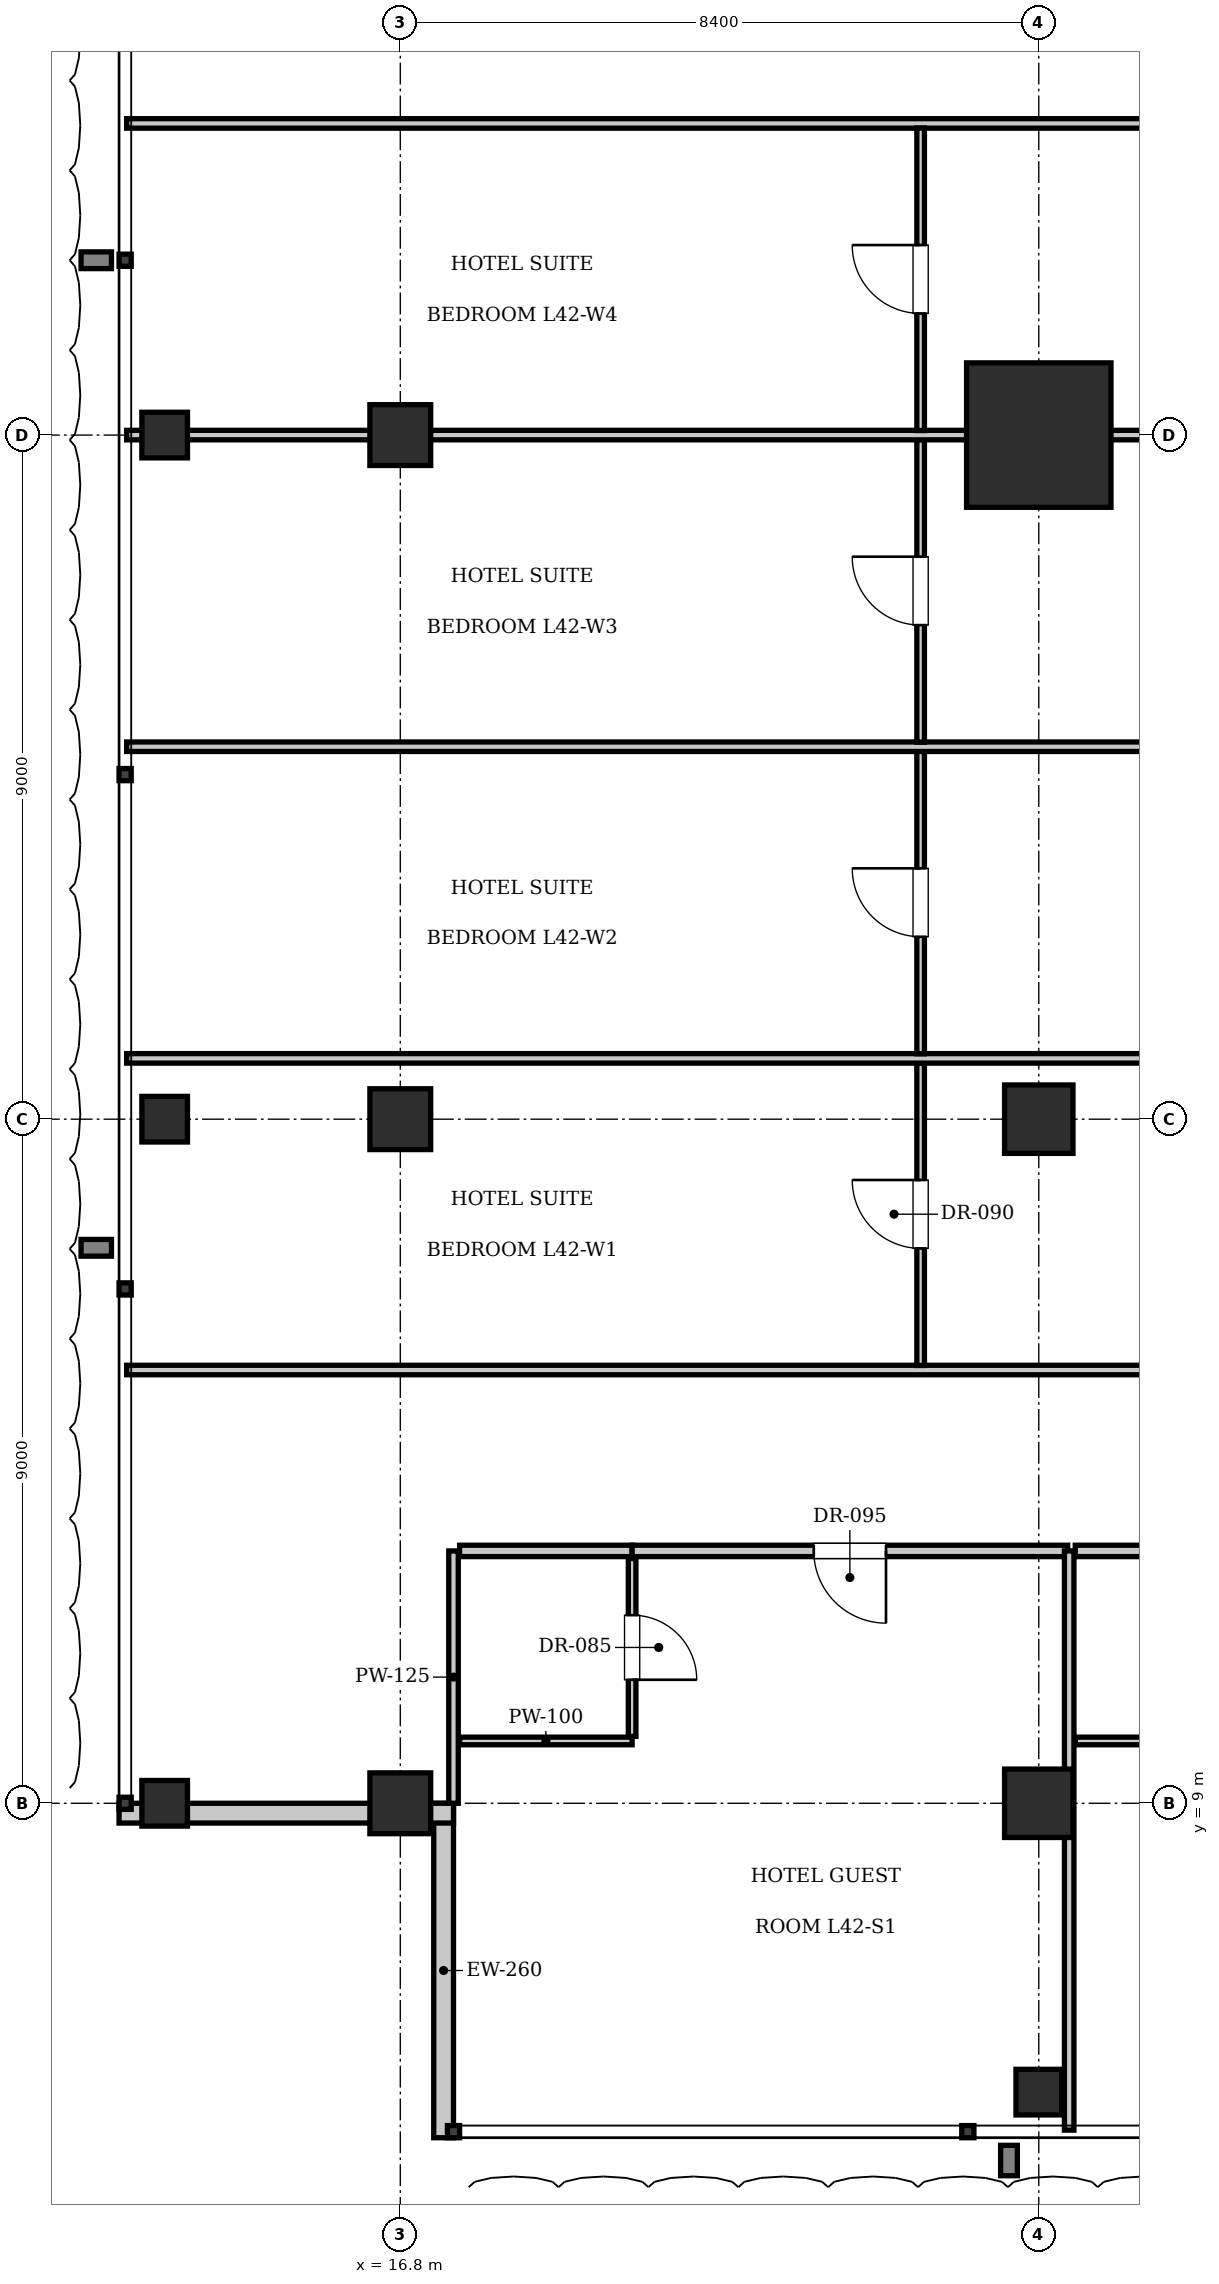
"""IFC4 building model, lengths in metres.
Left out: names, types, materials, properties, quantities, classifications, styles, units other than length and angle.
Written with IfcOpenShell. Run it as: python <this file> out.ifc"""

import sys

from ifc_helpers import new_model, si_unit, direction, frame, frame_2d, origin, origin_2d, place, context, subcontext, project, spatial, rectangle, i_section, extrude, element, fill, save


model = new_model("IFC4")
c1 = context("Model", 3, precision=1e-05, world=origin(), true_north=direction((0.0, 1.0)))
c2 = subcontext(c1, "Body", "Model", "MODEL_VIEW")
j1 = project(units=[si_unit("LENGTHUNIT", "METRE"), si_unit("PLANEANGLEUNIT", "RADIAN")], contexts=[c1])
p1 = place(None, origin())
s1 = spatial("IfcSite", under=j1, at=p1, CompositionType="ELEMENT")
p2 = place(p1, origin())
s2 = spatial("IfcBuilding", under=s1, at=p2, CompositionType="ELEMENT")
p3 = place(p2, frame((0.0, 0.0, 173.6)))
s3 = spatial("IfcBuildingStorey", under=s2, at=p3, CompositionType="ELEMENT", Elevation=173.6)
p4 = place(p3, frame((25.2, 27.0, 0.0), z_axis=(0.0, 0.0, 1.0), x_axis=(1.0, 0.0, 0.0)))
e1 = element("IfcColumn", 1, at=p4, inside=s3, PredefinedType="COLUMN", context=c2, shape_type="SweptSolid", body=[
    extrude(rectangle(XDim=1.9, YDim=1.9, at=origin_2d()), origin(), (0.0, 0.0, 1.0), 3.85),
])
for number, where, z_axis, x_axis in (
    (2, (25.2, 18.0, 0.0), (0.0, 0.0, 1.0), (1.0, 0.0, 0.0)),
    (3, (25.2, 9.0, 0.0), (0.0, 0.0, 1.0), (1.0, 0.0, 0.0)),
):
    element("IfcColumn", number, at=place(p3, frame(where, z_axis=z_axis, x_axis=x_axis)), inside=s3, PredefinedType="COLUMN", context=c2, shape_type="SweptSolid", body=[
        extrude(rectangle(XDim=0.9, YDim=0.9, at=origin_2d()), origin(), (0.0, 0.0, 1.0), 3.85),
    ])
for number, where, z_axis, x_axis in (
    (4, (16.8, 9.0, 0.0), (0.0, 0.0, 1.0), (1.0, 0.0, 0.0)),
    (5, (16.8, 18.0, 0.0), (0.0, 0.0, 1.0), (1.0, 0.0, 0.0)),
    (6, (16.8, 27.0, 0.0), (0.0, 0.0, 1.0), (1.0, 0.0, 0.0)),
):
    element("IfcColumn", number, at=place(p3, frame(where, z_axis=z_axis, x_axis=x_axis)), inside=s3, PredefinedType="COLUMN", context=c2, shape_type="SweptSolid", body=[
        extrude(rectangle(XDim=0.8, YDim=0.8, at=origin_2d()), origin(), (0.0, 0.0, 1.0), 3.85),
    ])
for number, where, z_axis, x_axis in (
    (7, (13.7, 9.0, 0.0), (0.0, 0.0, 1.0), (1.0, 0.0, 0.0)),
    (8, (13.7, 18.0, 0.0), (0.0, 0.0, 1.0), (1.0, 0.0, 0.0)),
    (9, (13.7, 27.0, 0.0), (0.0, 0.0, 1.0), (1.0, 0.0, 0.0)),
    (10, (25.2, 5.2, 0.0), (0.0, 0.0, 1.0), (1.0, 0.0, 0.0)),
):
    element("IfcColumn", number, at=place(p3, frame(where, z_axis=z_axis, x_axis=x_axis)), inside=s3, PredefinedType="COLUMN", context=c2, shape_type="SweptSolid", body=[
        extrude(i_section(OverallWidth=0.6, OverallDepth=0.6, WebThickness=0.025, FlangeThickness=0.038, at=origin_2d()), origin(), (0.0, 0.0, 1.0), 3.85),
    ])
p5 = place(p3, frame((17.37, 4.6, 0.0), z_axis=(0.0, 0.0, 1.0), x_axis=(0.0, 1.0, 0.0)))
e11 = element("IfcWall", 11, at=p5, inside=s3, PredefinedType="SOLIDWALL", context=c2, shape_type="SweptSolid", body=[
    extrude(rectangle(XDim=4.4, YDim=0.26, at=frame_2d((2.2, 0.0))), origin(), (0.0, 0.0, 1.0), 3.61),
])
p6 = place(p3, frame((17.5, 8.87, 0.0), z_axis=(0.0, 0.0, 1.0), x_axis=(-1.0, 0.0, 0.0)))
e12 = element("IfcWall", 12, at=p6, inside=s3, PredefinedType="SOLIDWALL", context=c2, shape_type="SweptSolid", body=[
    extrude(rectangle(XDim=4.4, YDim=0.26, at=frame_2d((2.2, 0.0))), origin(), (0.0, 0.0, 1.0), 3.007),
])
p7 = place(p3, frame((17.5, 9.0, 0.0), z_axis=(0.0, 0.0, 1.0), x_axis=(0.0, 1.0, 0.0)))
e13 = element("IfcWall", 13, at=p7, inside=s3, PredefinedType="PARTITIONING", context=c2, shape_type="SweptSolid", body=[
    extrude(rectangle(XDim=3.32, YDim=0.125, at=frame_2d((1.66, 0.0))), origin(), (0.0, 0.0, 1.0), 3.61),
])
p8 = place(p3, frame((17.58, 12.32, 0.0), z_axis=(0.0, 0.0, 1.0), x_axis=(1.0, 0.0, 0.0)))
e14 = element("IfcWall", 14, at=p8, inside=s3, PredefinedType="PARTITIONING", context=c2, shape_type="SweptSolid", body=[
    extrude(rectangle(XDim=2.27, YDim=0.15, at=frame_2d((1.135, 0.0))), origin(), (0.0, 0.0, 1.0), 3.61),
])
p9 = place(p3, frame((17.58, 9.82, 0.0), z_axis=(0.0, 0.0, 1.0), x_axis=(1.0, 0.0, 0.0)))
e15 = element("IfcWall", 15, at=p9, inside=s3, PredefinedType="PARTITIONING", context=c2, shape_type="SweptSolid", body=[
    extrude(rectangle(XDim=2.27, YDim=0.1, at=frame_2d((1.135, 0.0))), origin(), (0.0, 0.0, 1.0), 3.61),
])
p10 = place(p3, frame((19.85, 9.88, 0.0), z_axis=(0.0, 0.0, 1.0), x_axis=(0.0, 1.0, 0.0)))
e16 = element("IfcWall", 16, at=p10, inside=s3, PredefinedType="PARTITIONING", context=c2, shape_type="SweptSolid", body=[
    extrude(rectangle(XDim=2.34, YDim=0.1, at=frame_2d((1.17, 0.0))), origin(), (0.0, 0.0, 1.0), 3.61),
])
p11 = place(p10, frame((0.745, 0.0, 0.0)))
e17 = element("IfcOpeningElement", 17, at=p11, cuts=e16, PredefinedType="OPENING", context=c2, shape_type="SweptSolid", body=[
    extrude(rectangle(XDim=0.85, YDim=2.1, at=frame_2d((0.425, 1.05))), frame((0.0, 0.06, 0.0), z_axis=(0.0, -1.0, 0.0), x_axis=(1.0, 0.0, 0.0)), (0.0, 0.0, 1.0), 0.12),
])
p12 = place(p3, frame((19.85, 12.32, 0.0), z_axis=(0.0, 0.0, 1.0), x_axis=(1.0, 0.0, 0.0)))
e18 = element("IfcWall", 18, at=p12, inside=s3, PredefinedType="PARTITIONING", context=c2, shape_type="SweptSolid", body=[
    extrude(rectangle(XDim=5.73, YDim=0.15, at=frame_2d((2.865, 0.0))), origin(), (0.0, 0.0, 1.0), 3.61),
])
p13 = place(p12, frame((2.39, 0.0, 0.0)))
e19 = element("IfcOpeningElement", 19, at=p13, cuts=e18, PredefinedType="OPENING", context=c2, shape_type="SweptSolid", body=[
    extrude(rectangle(XDim=0.95, YDim=2.15, at=frame_2d((0.475, 1.075))), frame((0.0, 0.085, 0.0), z_axis=(0.0, -1.0, 0.0), x_axis=(1.0, 0.0, 0.0)), (0.0, 0.0, 1.0), 0.17),
])
p14 = place(p3, frame((25.6, 4.7, 0.0), z_axis=(0.0, 0.0, 1.0), x_axis=(0.0, 1.0, 0.0)))
e20 = element("IfcWall", 20, at=p14, inside=s3, PredefinedType="PARTITIONING", context=c2, shape_type="SweptSolid", body=[
    extrude(rectangle(XDim=7.62, YDim=0.125, at=frame_2d((3.81, 0.0))), origin(), (0.0, 0.0, 1.0), 3.61),
])
p15 = place(p3, frame((25.68, 12.32, 0.0), z_axis=(0.0, 0.0, 1.0), x_axis=(1.0, 0.0, 0.0)))
e21 = element("IfcWall", 21, at=p15, inside=s3, PredefinedType="PARTITIONING", context=c2, shape_type="SweptSolid", body=[
    extrude(rectangle(XDim=2.27, YDim=0.15, at=frame_2d((1.135, 0.0))), origin(), (0.0, 0.0, 1.0), 3.61),
])
p16 = place(p3, frame((25.68, 9.82, 0.0), z_axis=(0.0, 0.0, 1.0), x_axis=(1.0, 0.0, 0.0)))
e22 = element("IfcWall", 22, at=p16, inside=s3, PredefinedType="PARTITIONING", context=c2, shape_type="SweptSolid", body=[
    extrude(rectangle(XDim=2.27, YDim=0.1, at=frame_2d((1.135, 0.0))), origin(), (0.0, 0.0, 1.0), 3.61),
])
for number, where, z_axis, x_axis in (
    (23, (13.2, 14.7, 0.0), (0.0, 0.0, 1.0), (1.0, 0.0, 0.0)),
    (24, (13.2, 31.1, 0.0), (0.0, 0.0, 1.0), (1.0, 0.0, 0.0)),
):
    element("IfcWall", number, at=place(p3, frame(where, z_axis=z_axis, x_axis=x_axis)), inside=s3, PredefinedType="PARTITIONING", context=c2, shape_type="SweptSolid", body=[
        extrude(rectangle(XDim=24.32, YDim=0.125, at=frame_2d((12.16, 0.0))), origin(), (0.0, 0.0, 1.0), 3.61),
    ])
p17 = place(p3, frame((23.646, 14.76, 0.0), z_axis=(0.0, 0.0, 1.0), x_axis=(0.0, 1.0, 0.0)))
e25 = element("IfcWall", 25, at=p17, inside=s3, PredefinedType="PARTITIONING", context=c2, shape_type="SweptSolid", body=[
    extrude(rectangle(XDim=3.98, YDim=0.1, at=frame_2d((1.99, 0.0))), origin(), (0.0, 0.0, 1.0), 3.61),
])
p18 = place(p17, frame((1.54, 0.0, 0.0)))
e26 = element("IfcOpeningElement", 26, at=p18, cuts=e25, PredefinedType="OPENING", context=c2, shape_type="SweptSolid", body=[
    extrude(rectangle(XDim=0.9, YDim=2.1, at=frame_2d((0.45, 1.05))), frame((0.0, 0.06, 0.0), z_axis=(0.0, -1.0, 0.0), x_axis=(1.0, 0.0, 0.0)), (0.0, 0.0, 1.0), 0.12),
])
p19 = place(p3, frame((13.2, 18.8, 0.0), z_axis=(0.0, 0.0, 1.0), x_axis=(1.0, 0.0, 0.0)))
e27 = element("IfcWall", 27, at=p19, inside=s3, PredefinedType="PARTITIONING", context=c2, shape_type="SweptSolid", body=[
    extrude(rectangle(XDim=24.32, YDim=0.125, at=frame_2d((12.16, 0.0))), origin(), (0.0, 0.0, 1.0), 3.61),
])
p20 = place(p3, frame((23.646, 18.86, 0.0), z_axis=(0.0, 0.0, 1.0), x_axis=(0.0, 1.0, 0.0)))
e28 = element("IfcWall", 28, at=p20, inside=s3, PredefinedType="PARTITIONING", context=c2, shape_type="SweptSolid", body=[
    extrude(rectangle(XDim=3.98, YDim=0.1, at=frame_2d((1.99, 0.0))), origin(), (0.0, 0.0, 1.0), 3.61),
])
p21 = place(p20, frame((1.54, 0.0, 0.0)))
e29 = element("IfcOpeningElement", 29, at=p21, cuts=e28, PredefinedType="OPENING", context=c2, shape_type="SweptSolid", body=[
    extrude(rectangle(XDim=0.9, YDim=2.1, at=frame_2d((0.45, 1.05))), frame((0.0, 0.06, 0.0), z_axis=(0.0, -1.0, 0.0), x_axis=(1.0, 0.0, 0.0)), (0.0, 0.0, 1.0), 0.12),
])
p22 = place(p3, frame((13.2, 22.9, 0.0), z_axis=(0.0, 0.0, 1.0), x_axis=(1.0, 0.0, 0.0)))
e30 = element("IfcWall", 30, at=p22, inside=s3, PredefinedType="PARTITIONING", context=c2, shape_type="SweptSolid", body=[
    extrude(rectangle(XDim=24.32, YDim=0.125, at=frame_2d((12.16, 0.0))), origin(), (0.0, 0.0, 1.0), 3.61),
])
p23 = place(p3, frame((23.646, 22.96, 0.0), z_axis=(0.0, 0.0, 1.0), x_axis=(0.0, 1.0, 0.0)))
e31 = element("IfcWall", 31, at=p23, inside=s3, PredefinedType="PARTITIONING", context=c2, shape_type="SweptSolid", body=[
    extrude(rectangle(XDim=3.98, YDim=0.1, at=frame_2d((1.99, 0.0))), origin(), (0.0, 0.0, 1.0), 3.61),
])
p24 = place(p23, frame((1.54, 0.0, 0.0)))
e32 = element("IfcOpeningElement", 32, at=p24, cuts=e31, PredefinedType="OPENING", context=c2, shape_type="SweptSolid", body=[
    extrude(rectangle(XDim=0.9, YDim=2.1, at=frame_2d((0.45, 1.05))), frame((0.0, 0.06, 0.0), z_axis=(0.0, -1.0, 0.0), x_axis=(1.0, 0.0, 0.0)), (0.0, 0.0, 1.0), 0.12),
])
p25 = place(p3, frame((13.2, 27.0, 0.0), z_axis=(0.0, 0.0, 1.0), x_axis=(1.0, 0.0, 0.0)))
e33 = element("IfcWall", 33, at=p25, inside=s3, PredefinedType="PARTITIONING", context=c2, shape_type="SweptSolid", body=[
    extrude(rectangle(XDim=24.32, YDim=0.125, at=frame_2d((12.16, 0.0))), origin(), (0.0, 0.0, 1.0), 2.41),
])
p26 = place(p3, frame((23.646, 27.06, 0.0), z_axis=(0.0, 0.0, 1.0), x_axis=(0.0, 1.0, 0.0)))
e34 = element("IfcWall", 34, at=p26, inside=s3, PredefinedType="PARTITIONING", context=c2, shape_type="SweptSolid", body=[
    extrude(rectangle(XDim=3.98, YDim=0.1, at=frame_2d((1.99, 0.0))), origin(), (0.0, 0.0, 1.0), 3.61),
])
p27 = place(p26, frame((1.54, 0.0, 0.0)))
e35 = element("IfcOpeningElement", 35, at=p27, cuts=e34, PredefinedType="OPENING", context=c2, shape_type="SweptSolid", body=[
    extrude(rectangle(XDim=0.9, YDim=2.1, at=frame_2d((0.45, 1.05))), frame((0.0, 0.06, 0.0), z_axis=(0.0, -1.0, 0.0), x_axis=(1.0, 0.0, 0.0)), (0.0, 0.0, 1.0), 0.12),
])
p28 = place(p11, frame((0.85, 0.0, 0.0), z_axis=(0.0, 0.0, 1.0), x_axis=(-1.0, 0.0, 0.0)))
e36 = element("IfcDoor", 36, at=p28, inside=s3, OperationType="SINGLE_SWING_RIGHT", PredefinedType="DOOR", context=c2, shape_type="SweptSolid", body=[
    extrude(rectangle(XDim=0.85, YDim=2.1, at=frame_2d((0.425, 1.05))), frame((0.0, 0.025, 0.0), z_axis=(0.0, -1.0, 0.0), x_axis=(1.0, 0.0, 0.0)), (0.0, 0.0, 1.0), 0.05),
])
fill(e17, e36)
p29 = place(p13, frame((0.95, 0.0, 0.0), z_axis=(0.0, 0.0, 1.0), x_axis=(-1.0, 0.0, 0.0)))
e37 = element("IfcDoor", 37, at=p29, inside=s3, OperationType="SINGLE_SWING_LEFT", PredefinedType="DOOR", context=c2, shape_type="SweptSolid", body=[
    extrude(rectangle(XDim=0.95, YDim=2.15, at=frame_2d((0.475, 1.075))), frame((0.0, 0.025, 0.0), z_axis=(0.0, -1.0, 0.0), x_axis=(1.0, 0.0, 0.0)), (0.0, 0.0, 1.0), 0.05),
])
fill(e19, e37)
p30 = place(p18, origin())
e38 = element("IfcDoor", 38, at=p30, inside=s3, OperationType="SINGLE_SWING_RIGHT", PredefinedType="DOOR", context=c2, shape_type="SweptSolid", body=[
    extrude(rectangle(XDim=0.9, YDim=2.1, at=frame_2d((0.45, 1.05))), frame((0.0, 0.025, 0.0), z_axis=(0.0, -1.0, 0.0), x_axis=(1.0, 0.0, 0.0)), (0.0, 0.0, 1.0), 0.05),
])
fill(e26, e38)
p31 = place(p21, origin())
e39 = element("IfcDoor", 39, at=p31, inside=s3, OperationType="SINGLE_SWING_RIGHT", PredefinedType="DOOR", context=c2, shape_type="SweptSolid", body=[
    extrude(rectangle(XDim=0.9, YDim=2.1, at=frame_2d((0.45, 1.05))), frame((0.0, 0.025, 0.0), z_axis=(0.0, -1.0, 0.0), x_axis=(1.0, 0.0, 0.0)), (0.0, 0.0, 1.0), 0.05),
])
fill(e29, e39)
p32 = place(p24, origin())
e40 = element("IfcDoor", 40, at=p32, inside=s3, OperationType="SINGLE_SWING_RIGHT", PredefinedType="DOOR", context=c2, shape_type="SweptSolid", body=[
    extrude(rectangle(XDim=0.9, YDim=2.1, at=frame_2d((0.45, 1.05))), frame((0.0, 0.025, 0.0), z_axis=(0.0, -1.0, 0.0), x_axis=(1.0, 0.0, 0.0)), (0.0, 0.0, 1.0), 0.05),
])
fill(e32, e40)
p33 = place(p27, origin())
e41 = element("IfcDoor", 41, at=p33, inside=s3, OperationType="SINGLE_SWING_RIGHT", PredefinedType="DOOR", context=c2, shape_type="SweptSolid", body=[
    extrude(rectangle(XDim=0.9, YDim=2.1, at=frame_2d((0.45, 1.05))), frame((0.0, 0.025, 0.0), z_axis=(0.0, -1.0, 0.0), x_axis=(1.0, 0.0, 0.0)), (0.0, 0.0, 1.0), 0.05),
])
fill(e35, e41)
save(model, sys.argv[1])
